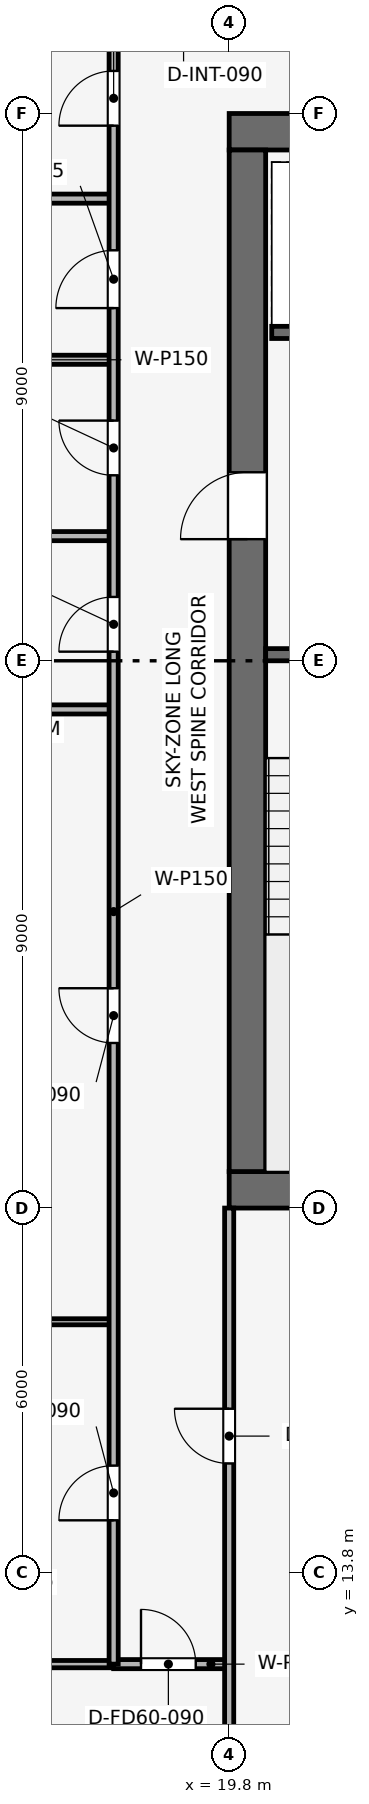
"""IFC4 building model, lengths in metres.
Left out: names, types, materials, properties, quantities, classifications, styles, units other than length and angle.
Written with IfcOpenShell. Run it as: python <this file> out.ifc"""

import sys

from ifc_helpers import new_model, si_unit, direction, frame, frame_2d, origin, place, context, subcontext, project, spatial, rectangle, extrude, element, fill, save


model = new_model("IFC4")
c1 = context("Model", 3, precision=1e-05, world=origin(), true_north=direction((0.0, 1.0)))
c2 = subcontext(c1, "Body", "Model", "MODEL_VIEW")
j1 = project(units=[si_unit("LENGTHUNIT", "METRE"), si_unit("PLANEANGLEUNIT", "RADIAN")], contexts=[c1])
p1 = place(None, origin())
s1 = spatial("IfcSite", under=j1, at=p1, CompositionType="ELEMENT")
p2 = place(p1, origin())
s2 = spatial("IfcBuilding", under=s1, at=p2, CompositionType="ELEMENT")
p3 = place(p2, frame((0.0, 0.0, 329.25)))
s3 = spatial("IfcBuildingStorey", under=s2, at=p3, CompositionType="ELEMENT", Elevation=329.25)
p4 = place(p3, frame((19.8, 20.1, 0.0), z_axis=(0.0, 0.0, 1.0), x_axis=(1.0, 0.0, 0.0)))
e1 = element("IfcWall", 1, at=p4, inside=s3, PredefinedType="SHEAR", context=c2, shape_type="SweptSolid", body=[
    extrude(rectangle(XDim=18.0, YDim=0.6, at=frame_2d((9.0, 0.0))), origin(), (0.0, 0.0, 1.0), 3.75),
])
p5 = place(p3, frame((19.8, 37.5, 0.0), z_axis=(0.0, 0.0, 1.0), x_axis=(1.0, 0.0, 0.0)))
e2 = element("IfcWall", 2, at=p5, inside=s3, PredefinedType="SHEAR", context=c2, shape_type="SweptSolid", body=[
    extrude(rectangle(XDim=18.0, YDim=0.6, at=frame_2d((9.0, 0.0))), origin(), (0.0, 0.0, 1.0), 3.75),
])
p6 = place(p5, frame((7.05, 0.0, 0.0)))
e3 = element("IfcOpeningElement", 3, at=p6, cuts=e2, PredefinedType="OPENING", context=c2, shape_type="SweptSolid", body=[
    extrude(rectangle(XDim=1.1, YDim=2.15, at=frame_2d((0.55, 1.075))), frame((0.0, 0.31, 0.0), z_axis=(0.0, -1.0, 0.0), x_axis=(1.0, 0.0, 0.0)), (0.0, 0.0, 1.0), 0.62),
])
p7 = place(p3, frame((20.1, 20.4, 0.0), z_axis=(0.0, 0.0, 1.0), x_axis=(0.0, 1.0, 0.0)))
e4 = element("IfcWall", 4, at=p7, inside=s3, PredefinedType="SHEAR", context=c2, shape_type="SweptSolid", body=[
    extrude(rectangle(XDim=16.8, YDim=0.6, at=frame_2d((8.4, 0.0))), origin(), (0.0, 0.0, 1.0), 3.75),
])
p8 = place(p7, frame((10.4, 0.0, 0.0)))
e5 = element("IfcOpeningElement", 5, at=p8, cuts=e4, PredefinedType="OPENING", context=c2, shape_type="SweptSolid", body=[
    extrude(rectangle(XDim=1.1, YDim=2.15, at=frame_2d((0.55, 1.075))), frame((0.0, 0.31, 0.0), z_axis=(0.0, -1.0, 0.0), x_axis=(1.0, 0.0, 0.0)), (0.0, 0.0, 1.0), 0.62),
])
p9 = place(p3, frame((20.4, 28.9, 0.0), z_axis=(0.0, 0.0, 1.0), x_axis=(1.0, 0.0, 0.0)))
e6 = element("IfcWall", 6, at=p9, inside=s3, PredefinedType="SHEAR", context=c2, shape_type="SweptSolid", body=[
    extrude(rectangle(XDim=3.15, YDim=0.2, at=frame_2d((1.575, 0.0))), origin(), (0.0, 0.0, 1.0), 3.51),
])
p10 = place(p9, frame((0.8, 0.0, 0.0)))
e7 = element("IfcOpeningElement", 7, at=p10, cuts=e6, PredefinedType="OPENING", context=c2, shape_type="SweptSolid", body=[
    extrude(rectangle(XDim=1.0, YDim=2.1, at=frame_2d((0.5, 1.05))), frame((0.0, 0.11, 0.0), z_axis=(0.0, -1.0, 0.0), x_axis=(1.0, 0.0, 0.0)), (0.0, 0.0, 1.0), 0.22),
])
p11 = place(p3, frame((20.5, 34.2, 0.0), z_axis=(0.0, 0.0, 1.0), x_axis=(1.0, 0.0, 0.0)))
e8 = element("IfcWall", 8, at=p11, inside=s3, PredefinedType="SHEAR", context=c2, shape_type="SweptSolid", body=[
    extrude(rectangle(XDim=3.05, YDim=0.2, at=frame_2d((1.525, 0.0))), origin(), (0.0, 0.0, 1.0), 3.51),
])
p12 = place(p11, frame((0.75, 0.0, 0.0)))
e9 = element("IfcOpeningElement", 9, at=p12, cuts=e8, PredefinedType="OPENING", context=c2, shape_type="SweptSolid", body=[
    extrude(rectangle(XDim=1.1, YDim=2.15, at=frame_2d((0.55, 1.075))), frame((0.0, 0.11, 0.0), z_axis=(0.0, -1.0, 0.0), x_axis=(1.0, 0.0, 0.0)), (0.0, 0.0, 1.0), 0.22),
])
p13 = place(p3, frame((6.13, 28.0, 0.0), z_axis=(0.0, 0.0, 1.0), x_axis=(1.0, 0.0, 0.0)))
e10 = element("IfcWall", 10, at=p13, inside=s3, PredefinedType="PARTITIONING", context=c2, shape_type="SweptSolid", body=[
    extrude(rectangle(XDim=11.77, YDim=0.15, at=frame_2d((5.885, 0.0))), origin(), (0.0, 0.0, 1.0), 3.135),
])
for number, where, z_axis, x_axis in (
    (11, (14.8, 36.4, 0.0), (0.0, 0.0, 1.0), (1.0, 0.0, 0.0)),
    (12, (14.8, 30.85, 0.0), (0.0, 0.0, 1.0), (1.0, 0.0, 0.0)),
    (13, (14.8, 33.75, 0.0), (0.0, 0.0, 1.0), (1.0, 0.0, 0.0)),
):
    element("IfcWall", number, at=place(p3, frame(where, z_axis=z_axis, x_axis=x_axis)), inside=s3, PredefinedType="PARTITIONING", context=c2, shape_type="SweptSolid", body=[
        extrude(rectangle(XDim=3.1, YDim=0.15, at=frame_2d((1.55, 0.0))), origin(), (0.0, 0.0, 1.0), 3.135),
    ])
p14 = place(p3, frame((6.13, 17.93, 0.0), z_axis=(0.0, 0.0, 1.0), x_axis=(1.0, 0.0, 0.0)))
e14 = element("IfcWall", 14, at=p14, inside=s3, PredefinedType="MOVABLE", context=c2, shape_type="SweptSolid", body=[
    extrude(rectangle(XDim=11.77, YDim=0.1, at=frame_2d((5.885, 0.0))), origin(), (0.0, 0.0, 1.0), 3.095),
])
p15 = place(p3, frame((12.3, 12.3, 0.0), z_axis=(0.0, 0.0, 1.0), x_axis=(1.0, 0.0, 0.0)))
e15 = element("IfcWall", 15, at=p15, inside=s3, PredefinedType="PARTITIONING", context=c2, shape_type="SweptSolid", body=[
    extrude(rectangle(XDim=5.6, YDim=0.12, at=frame_2d((2.8, 0.0))), origin(), (0.0, 0.0, 1.0), 3.195),
])
p16 = place(p3, frame((17.9, 12.3, 0.0), z_axis=(0.0, 0.0, 1.0), x_axis=(1.0, 0.0, 0.0)))
e16 = element("IfcWall", 16, at=p16, inside=s3, PredefinedType="PARTITIONING", context=c2, shape_type="SweptSolid", body=[
    extrude(rectangle(XDim=1.9, YDim=0.15, at=frame_2d((0.95, 0.0))), origin(), (0.0, 0.0, 1.0), 3.51),
])
p17 = place(p16, frame((0.45, 0.0, 0.0)))
e17 = element("IfcOpeningElement", 17, at=p17, cuts=e16, PredefinedType="OPENING", context=c2, shape_type="SweptSolid", body=[
    extrude(rectangle(XDim=0.9, YDim=2.1, at=frame_2d((0.45, 1.05))), frame((0.0, 0.085, 0.0), z_axis=(0.0, -1.0, 0.0), x_axis=(1.0, 0.0, 0.0)), (0.0, 0.0, 1.0), 0.17),
])
p18 = place(p3, frame((19.8, 6.13, 0.0), z_axis=(0.0, 0.0, 1.0), x_axis=(0.0, 1.0, 0.0)))
e18 = element("IfcWall", 18, at=p18, inside=s3, PredefinedType="PARTITIONING", context=c2, shape_type="SweptSolid", body=[
    extrude(rectangle(XDim=13.67, YDim=0.15, at=frame_2d((6.835, 0.0))), origin(), (0.0, 0.0, 1.0), 3.095),
])
p19 = place(p18, frame((9.47, 0.0, 0.0)))
e19 = element("IfcOpeningElement", 19, at=p19, cuts=e18, PredefinedType="OPENING", context=c2, shape_type="SweptSolid", body=[
    extrude(rectangle(XDim=0.9, YDim=2.1, at=frame_2d((0.45, 1.05))), frame((0.0, 0.085, 0.0), z_axis=(0.0, -1.0, 0.0), x_axis=(1.0, 0.0, 0.0)), (0.0, 0.0, 1.0), 0.17),
])
p20 = place(p3, frame((17.9, 12.3, 0.0), z_axis=(0.0, 0.0, 1.0), x_axis=(0.0, 1.0, 0.0)))
e20 = element("IfcWall", 20, at=p20, inside=s3, PredefinedType="PARTITIONING", context=c2, shape_type="SweptSolid", body=[
    extrude(rectangle(XDim=27.4, YDim=0.15, at=frame_2d((13.7, 0.0))), origin(), (0.0, 0.0, 1.0), 3.095),
])
p21 = place(p20, frame((2.365, 0.0, 0.0)))
e21 = element("IfcOpeningElement", 21, at=p21, cuts=e20, PredefinedType="OPENING", context=c2, shape_type="SweptSolid", body=[
    extrude(rectangle(XDim=0.9, YDim=2.1, at=frame_2d((0.45, 1.05))), frame((0.0, 0.085, 0.0), z_axis=(0.0, -1.0, 0.0), x_axis=(1.0, 0.0, 0.0)), (0.0, 0.0, 1.0), 0.17),
])
p22 = place(p20, frame((10.215, 0.0, 0.0)))
e22 = element("IfcOpeningElement", 22, at=p22, cuts=e20, PredefinedType="OPENING", context=c2, shape_type="SweptSolid", body=[
    extrude(rectangle(XDim=0.9, YDim=2.1, at=frame_2d((0.45, 1.05))), frame((0.0, 0.085, 0.0), z_axis=(0.0, -1.0, 0.0), x_axis=(1.0, 0.0, 0.0)), (0.0, 0.0, 1.0), 0.17),
])
p23 = place(p20, frame((16.65, 0.0, 0.0)))
e23 = element("IfcOpeningElement", 23, at=p23, cuts=e20, PredefinedType="OPENING", context=c2, shape_type="SweptSolid", body=[
    extrude(rectangle(XDim=0.9, YDim=2.1, at=frame_2d((0.45, 1.05))), frame((0.0, 0.085, 0.0), z_axis=(0.0, -1.0, 0.0), x_axis=(1.0, 0.0, 0.0)), (0.0, 0.0, 1.0), 0.17),
])
p24 = place(p20, frame((19.55, 0.0, 0.0)))
e24 = element("IfcOpeningElement", 24, at=p24, cuts=e20, PredefinedType="OPENING", context=c2, shape_type="SweptSolid", body=[
    extrude(rectangle(XDim=0.9, YDim=2.1, at=frame_2d((0.45, 1.05))), frame((0.0, 0.085, 0.0), z_axis=(0.0, -1.0, 0.0), x_axis=(1.0, 0.0, 0.0)), (0.0, 0.0, 1.0), 0.17),
])
p25 = place(p20, frame((22.3, 0.0, 0.0)))
e25 = element("IfcOpeningElement", 25, at=p25, cuts=e20, PredefinedType="OPENING", context=c2, shape_type="SweptSolid", body=[
    extrude(rectangle(XDim=0.95, YDim=2.1, at=frame_2d((0.475, 1.05))), frame((0.0, 0.085, 0.0), z_axis=(0.0, -1.0, 0.0), x_axis=(1.0, 0.0, 0.0)), (0.0, 0.0, 1.0), 0.17),
])
p26 = place(p20, frame((25.3, 0.0, 0.0)))
e26 = element("IfcOpeningElement", 26, at=p26, cuts=e20, PredefinedType="OPENING", context=c2, shape_type="SweptSolid", body=[
    extrude(rectangle(XDim=0.9, YDim=2.1, at=frame_2d((0.45, 1.05))), frame((0.0, 0.085, 0.0), z_axis=(0.0, -1.0, 0.0), x_axis=(1.0, 0.0, 0.0)), (0.0, 0.0, 1.0), 0.17),
])
p27 = place(p17, origin())
e27 = element("IfcDoor", 27, at=p27, inside=s3, OperationType="SINGLE_SWING_LEFT", PredefinedType="DOOR", context=c2, shape_type="SweptSolid", body=[
    extrude(rectangle(XDim=0.9, YDim=2.1, at=frame_2d((0.45, 1.05))), frame((0.0, 0.025, 0.0), z_axis=(0.0, -1.0, 0.0), x_axis=(1.0, 0.0, 0.0)), (0.0, 0.0, 1.0), 0.05),
])
fill(e17, e27)
p28 = place(p19, origin())
e28 = element("IfcDoor", 28, at=p28, inside=s3, OperationType="SINGLE_SWING_RIGHT", PredefinedType="DOOR", context=c2, shape_type="SweptSolid", body=[
    extrude(rectangle(XDim=0.9, YDim=2.1, at=frame_2d((0.45, 1.05))), frame((0.0, 0.025, 0.0), z_axis=(0.0, -1.0, 0.0), x_axis=(1.0, 0.0, 0.0)), (0.0, 0.0, 1.0), 0.05),
])
fill(e19, e28)
p29 = place(p21, origin())
e29 = element("IfcDoor", 29, at=p29, inside=s3, OperationType="SINGLE_SWING_LEFT", PredefinedType="DOOR", context=c2, shape_type="SweptSolid", body=[
    extrude(rectangle(XDim=0.9, YDim=2.1, at=frame_2d((0.45, 1.05))), frame((0.0, 0.025, 0.0), z_axis=(0.0, -1.0, 0.0), x_axis=(1.0, 0.0, 0.0)), (0.0, 0.0, 1.0), 0.05),
])
fill(e21, e29)
p30 = place(p22, origin())
e30 = element("IfcDoor", 30, at=p30, inside=s3, OperationType="SINGLE_SWING_RIGHT", PredefinedType="DOOR", context=c2, shape_type="SweptSolid", body=[
    extrude(rectangle(XDim=0.9, YDim=2.1, at=frame_2d((0.45, 1.05))), frame((0.0, 0.025, 0.0), z_axis=(0.0, -1.0, 0.0), x_axis=(1.0, 0.0, 0.0)), (0.0, 0.0, 1.0), 0.05),
])
fill(e22, e30)
p31 = place(p23, origin())
e31 = element("IfcDoor", 31, at=p31, inside=s3, OperationType="SINGLE_SWING_LEFT", PredefinedType="DOOR", context=c2, shape_type="SweptSolid", body=[
    extrude(rectangle(XDim=0.9, YDim=2.1, at=frame_2d((0.45, 1.05))), frame((0.0, 0.025, 0.0), z_axis=(0.0, -1.0, 0.0), x_axis=(1.0, 0.0, 0.0)), (0.0, 0.0, 1.0), 0.05),
])
fill(e23, e31)
p32 = place(p24, origin())
e32 = element("IfcDoor", 32, at=p32, inside=s3, OperationType="SINGLE_SWING_RIGHT", PredefinedType="DOOR", context=c2, shape_type="SweptSolid", body=[
    extrude(rectangle(XDim=0.9, YDim=2.1, at=frame_2d((0.45, 1.05))), frame((0.0, 0.025, 0.0), z_axis=(0.0, -1.0, 0.0), x_axis=(1.0, 0.0, 0.0)), (0.0, 0.0, 1.0), 0.05),
])
fill(e24, e32)
p33 = place(p25, origin())
e33 = element("IfcDoor", 33, at=p33, inside=s3, OperationType="SINGLE_SWING_LEFT", PredefinedType="DOOR", context=c2, shape_type="SweptSolid", body=[
    extrude(rectangle(XDim=0.95, YDim=2.1, at=frame_2d((0.475, 1.05))), frame((0.0, 0.025, 0.0), z_axis=(0.0, -1.0, 0.0), x_axis=(1.0, 0.0, 0.0)), (0.0, 0.0, 1.0), 0.05),
])
fill(e25, e33)
p34 = place(p26, origin())
e34 = element("IfcDoor", 34, at=p34, inside=s3, OperationType="SINGLE_SWING_LEFT", PredefinedType="DOOR", context=c2, shape_type="SweptSolid", body=[
    extrude(rectangle(XDim=0.9, YDim=2.1, at=frame_2d((0.45, 1.05))), frame((0.0, 0.025, 0.0), z_axis=(0.0, -1.0, 0.0), x_axis=(1.0, 0.0, 0.0)), (0.0, 0.0, 1.0), 0.05),
])
fill(e26, e34)
p35 = place(p8, origin())
e35 = element("IfcDoor", 35, at=p35, inside=s3, OperationType="SINGLE_SWING_LEFT", PredefinedType="DOOR", context=c2, shape_type="SweptSolid", body=[
    extrude(rectangle(XDim=1.1, YDim=2.15, at=frame_2d((0.55, 1.075))), frame((0.0, 0.025, 0.0), z_axis=(0.0, -1.0, 0.0), x_axis=(1.0, 0.0, 0.0)), (0.0, 0.0, 1.0), 0.05),
])
fill(e5, e35)
save(model, sys.argv[1])
